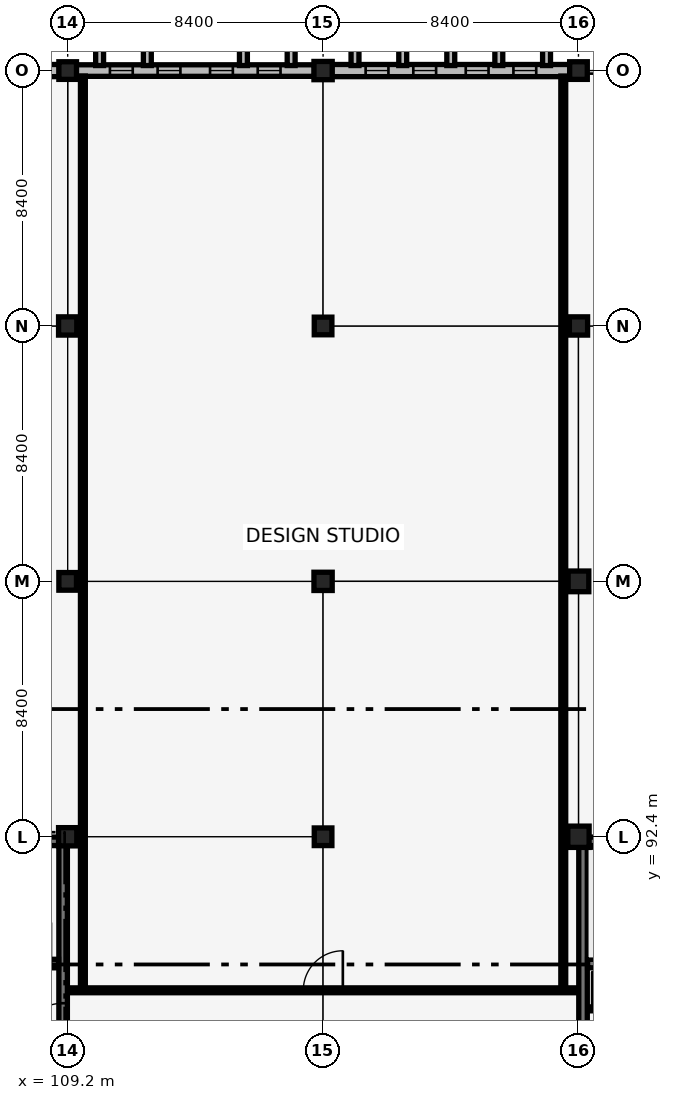
"""IFC4 building model, lengths in metres.
Left out: names, types, materials, properties, quantities, classifications, styles, units other than length and angle.
Written with IfcOpenShell. Run it as: python <this file> out.ifc"""

import sys

from ifc_helpers import new_model, si_unit, direction, frame, frame_2d, origin, origin_2d, place, context, subcontext, project, spatial, rectangle, extrude, element, fill, save


model = new_model("IFC4")
c1 = context("Model", 3, precision=1e-05, world=origin(), true_north=direction((0.0, 1.0)))
c2 = subcontext(c1, "Body", "Model", "MODEL_VIEW")
j1 = project(units=[si_unit("LENGTHUNIT", "METRE"), si_unit("PLANEANGLEUNIT", "RADIAN")], contexts=[c1])
p1 = place(None, origin())
s1 = spatial("IfcSite", under=j1, at=p1, CompositionType="ELEMENT")
p2 = place(p1, origin())
s2 = spatial("IfcBuilding", under=s1, at=p2, CompositionType="ELEMENT")
p3 = place(p2, frame((0.0, 0.0, 9.86)))
s3 = spatial("IfcBuildingStorey", under=s2, at=p3, CompositionType="ELEMENT", Elevation=9.86)
for number, where, z_axis, x_axis in (
    (1, (126.15, 92.25, 0.0), (0.0, 0.0, 1.0), (1.0, 0.0, 0.0)),
    (2, (126.15, 84.15, 0.0), (0.0, 0.0, 1.0), (0.0, 1.0, 0.0)),
):
    element("IfcWall", number, at=place(p3, frame(where, z_axis=z_axis, x_axis=x_axis)), inside=s3, PredefinedType="SHEAR", context=c2, shape_type="SweptSolid", body=[
        extrude(rectangle(XDim=8.1, YDim=0.28, at=frame_2d((4.05, 0.0))), origin(), (0.0, 0.0, 1.0), 3.78),
    ])
p4 = place(p3, frame((126.3, 88.23, 0.0), z_axis=(0.0, 0.0, 1.0), x_axis=(1.0, 0.0, 0.0)))
e3 = element("IfcWall", 3, at=p4, inside=s3, PredefinedType="SHEAR", context=c2, shape_type="SweptSolid", body=[
    extrude(rectangle(XDim=7.8, YDim=0.28, at=frame_2d((3.9, 0.0))), origin(), (0.0, 0.0, 1.0), 3.78),
])
p5 = place(p4, frame((6.2, 0.0, 0.0)))
e4 = element("IfcOpeningElement", 4, at=p5, cuts=e3, PredefinedType="OPENING", context=c2, shape_type="SweptSolid", body=[
    extrude(rectangle(XDim=1.35, YDim=2.15, at=frame_2d((0.675, 1.075))), frame((0.0, 0.15, 0.0), z_axis=(0.0, -1.0, 0.0), x_axis=(1.0, 0.0, 0.0)), (0.0, 0.0, 1.0), 0.3),
])
p6 = place(p3, frame((100.95, 92.25, 0.0), z_axis=(0.0, 0.0, 1.0), x_axis=(1.0, 0.0, 0.0)))
e5 = element("IfcWall", 5, at=p6, inside=s3, PredefinedType="SHEAR", context=c2, shape_type="SweptSolid", body=[
    extrude(rectangle(XDim=8.1, YDim=0.28, at=frame_2d((4.05, 0.0))), origin(), (0.0, 0.0, 1.0), 3.78),
])
p7 = place(p3, frame((109.05, 84.15, 0.0), z_axis=(0.0, 0.0, 1.0), x_axis=(0.0, 1.0, 0.0)))
e6 = element("IfcWall", 6, at=p7, inside=s3, PredefinedType="SHEAR", context=c2, shape_type="SweptSolid", body=[
    extrude(rectangle(XDim=8.1, YDim=0.28, at=frame_2d((4.05, 0.0))), origin(), (0.0, 0.0, 1.0), 3.78),
])
p8 = place(p7, frame((1.325, 0.0, 0.0)))
e7 = element("IfcOpeningElement", 7, at=p8, cuts=e6, PredefinedType="OPENING", context=c2, shape_type="SweptSolid", body=[
    extrude(rectangle(XDim=1.45, YDim=2.15, at=frame_2d((0.725, 1.075))), frame((0.0, 0.15, 0.0), z_axis=(0.0, -1.0, 0.0), x_axis=(1.0, 0.0, 0.0)), (0.0, 0.0, 1.0), 0.3),
])
p9 = place(p3, frame((101.1, 88.23, 0.0), z_axis=(0.0, 0.0, 1.0), x_axis=(1.0, 0.0, 0.0)))
e8 = element("IfcWall", 8, at=p9, inside=s3, PredefinedType="SHEAR", context=c2, shape_type="SweptSolid", body=[
    extrude(rectangle(XDim=7.8, YDim=0.28, at=frame_2d((3.9, 0.0))), origin(), (0.0, 0.0, 1.0), 3.78),
])
p10 = place(p9, frame((6.2, 0.0, 0.0)))
e9 = element("IfcOpeningElement", 9, at=p10, cuts=e8, PredefinedType="OPENING", context=c2, shape_type="SweptSolid", body=[
    extrude(rectangle(XDim=1.35, YDim=2.15, at=frame_2d((0.675, 1.075))), frame((0.0, 0.15, 0.0), z_axis=(0.0, -1.0, 0.0), x_axis=(1.0, 0.0, 0.0)), (0.0, 0.0, 1.0), 0.3),
])
p11 = place(p3, frame((109.2, 92.4, 0.0), z_axis=(0.0, 0.0, 1.0), x_axis=(1.0, 0.0, 0.0)))
e10 = element("IfcColumn", 10, at=p11, inside=s3, PredefinedType="COLUMN", context=c2, shape_type="SweptSolid", body=[
    extrude(rectangle(XDim=0.6, YDim=0.6, at=origin_2d()), origin(), (0.0, 0.0, 1.0), 3.78),
])
p12 = place(p3, frame((109.2, 100.8, 0.0), z_axis=(0.0, 0.0, 1.0), x_axis=(1.0, 0.0, 0.0)))
e11 = element("IfcColumn", 11, at=p12, inside=s3, PredefinedType="COLUMN", context=c2, shape_type="SweptSolid", body=[
    extrude(rectangle(XDim=0.58, YDim=0.58, at=origin_2d()), origin(), (0.0, 0.0, 1.0), 3.78),
])
p13 = place(p3, frame((109.2, 109.2, 0.0), z_axis=(0.0, 0.0, 1.0), x_axis=(1.0, 0.0, 0.0)))
e12 = element("IfcColumn", 12, at=p13, inside=s3, PredefinedType="COLUMN", context=c2, shape_type="SweptSolid", body=[
    extrude(rectangle(XDim=0.6, YDim=0.6, at=origin_2d()), origin(), (0.0, 0.0, 1.0), 3.78),
])
for number, where, z_axis, x_axis in (
    (13, (109.2, 117.6, 0.0), (0.0, 0.0, 1.0), (1.0, 0.0, 0.0)),
    (14, (117.6, 92.4, 0.0), (0.0, 0.0, 1.0), (1.0, 0.0, 0.0)),
):
    element("IfcColumn", number, at=place(p3, frame(where, z_axis=z_axis, x_axis=x_axis)), inside=s3, PredefinedType="COLUMN", context=c2, shape_type="SweptSolid", body=[
        extrude(rectangle(XDim=0.58, YDim=0.58, at=origin_2d()), origin(), (0.0, 0.0, 1.0), 3.78),
    ])
p14 = place(p3, frame((117.6, 100.8, 0.0), z_axis=(0.0, 0.0, 1.0), x_axis=(1.0, 0.0, 0.0)))
e15 = element("IfcColumn", 15, at=p14, inside=s3, PredefinedType="COLUMN", context=c2, shape_type="SweptSolid", body=[
    extrude(rectangle(XDim=0.6, YDim=0.6, at=origin_2d()), origin(), (0.0, 0.0, 1.0), 3.78),
])
p15 = place(p3, frame((117.6, 109.2, 0.0), z_axis=(0.0, 0.0, 1.0), x_axis=(1.0, 0.0, 0.0)))
e16 = element("IfcColumn", 16, at=p15, inside=s3, PredefinedType="COLUMN", context=c2, shape_type="SweptSolid", body=[
    extrude(rectangle(XDim=0.58, YDim=0.58, at=origin_2d()), origin(), (0.0, 0.0, 1.0), 3.78),
])
p16 = place(p3, frame((117.6, 117.6, 0.0), z_axis=(0.0, 0.0, 1.0), x_axis=(1.0, 0.0, 0.0)))
e17 = element("IfcColumn", 17, at=p16, inside=s3, PredefinedType="COLUMN", context=c2, shape_type="SweptSolid", body=[
    extrude(rectangle(XDim=0.6, YDim=0.6, at=origin_2d()), origin(), (0.0, 0.0, 1.0), 3.78),
])
p17 = place(p3, frame((126.0, 92.4, 0.0), z_axis=(0.0, 0.0, 1.0), x_axis=(1.0, 0.0, 0.0)))
e18 = element("IfcColumn", 18, at=p17, inside=s3, PredefinedType="COLUMN", context=c2, shape_type="SweptSolid", body=[
    extrude(rectangle(XDim=0.7, YDim=0.7, at=origin_2d()), origin(), (0.0, 0.0, 1.0), 3.78),
])
p18 = place(p3, frame((126.0, 100.8, 0.0), z_axis=(0.0, 0.0, 1.0), x_axis=(1.0, 0.0, 0.0)))
e19 = element("IfcColumn", 19, at=p18, inside=s3, PredefinedType="COLUMN", context=c2, shape_type="SweptSolid", body=[
    extrude(rectangle(XDim=0.68, YDim=0.68, at=origin_2d()), origin(), (0.0, 0.0, 1.0), 3.78),
])
p19 = place(p3, frame((126.0, 109.2, 0.0), z_axis=(0.0, 0.0, 1.0), x_axis=(1.0, 0.0, 0.0)))
e20 = element("IfcColumn", 20, at=p19, inside=s3, PredefinedType="COLUMN", context=c2, shape_type="SweptSolid", body=[
    extrude(rectangle(XDim=0.6, YDim=0.6, at=origin_2d()), origin(), (0.0, 0.0, 1.0), 3.78),
])
p20 = place(p3, frame((126.0, 117.6, 0.0), z_axis=(0.0, 0.0, 1.0), x_axis=(1.0, 0.0, 0.0)))
e21 = element("IfcColumn", 21, at=p20, inside=s3, PredefinedType="COLUMN", context=c2, shape_type="SweptSolid", body=[
    extrude(rectangle(XDim=0.58, YDim=0.58, at=origin_2d()), origin(), (0.0, 0.0, 1.0), 3.78),
])
p21 = place(p3, frame((101.085, 117.6, 0.0), z_axis=(0.0, 0.0, 1.0), x_axis=(1.0, 0.0, 0.0)))
e22 = element("IfcWall", 22, at=p21, inside=s3, PredefinedType="SOLIDWALL", context=c2, shape_type="SweptSolid", body=[
    extrude(rectangle(XDim=7.84, YDim=0.4, at=frame_2d((3.92, 0.0))), origin(), (0.0, 0.0, 1.0), 3.01),
])
p22 = place(p21, frame((1.115, 0.0, 0.7)))
e23 = element("IfcOpeningElement", 23, at=p22, cuts=e22, PredefinedType="OPENING", context=c2, shape_type="SweptSolid", body=[
    extrude(rectangle(XDim=0.75, YDim=2.1, at=frame_2d((0.375, 1.05))), frame((0.0, 0.21, 0.0), z_axis=(0.0, -1.0, 0.0), x_axis=(1.0, 0.0, 0.0)), (0.0, 0.0, 1.0), 0.42),
])
p23 = place(p21, frame((2.683, 0.0, 0.7)))
e24 = element("IfcOpeningElement", 24, at=p23, cuts=e22, PredefinedType="OPENING", context=c2, shape_type="SweptSolid", body=[
    extrude(rectangle(XDim=0.75, YDim=2.1, at=frame_2d((0.375, 1.05))), frame((0.0, 0.21, 0.0), z_axis=(0.0, -1.0, 0.0), x_axis=(1.0, 0.0, 0.0)), (0.0, 0.0, 1.0), 0.42),
])
p24 = place(p21, frame((4.407, 0.0, 0.7)))
e25 = element("IfcOpeningElement", 25, at=p24, cuts=e22, PredefinedType="OPENING", context=c2, shape_type="SweptSolid", body=[
    extrude(rectangle(XDim=0.75, YDim=2.1, at=frame_2d((0.375, 1.05))), frame((0.0, 0.21, 0.0), z_axis=(0.0, -1.0, 0.0), x_axis=(1.0, 0.0, 0.0)), (0.0, 0.0, 1.0), 0.42),
])
p25 = place(p21, frame((5.975, 0.0, 0.7)))
e26 = element("IfcOpeningElement", 26, at=p25, cuts=e22, PredefinedType="OPENING", context=c2, shape_type="SweptSolid", body=[
    extrude(rectangle(XDim=0.75, YDim=2.1, at=frame_2d((0.375, 1.05))), frame((0.0, 0.21, 0.0), z_axis=(0.0, -1.0, 0.0), x_axis=(1.0, 0.0, 0.0)), (0.0, 0.0, 1.0), 0.42),
])
p26 = place(p3, frame((109.475, 117.6, 0.0), z_axis=(0.0, 0.0, 1.0), x_axis=(1.0, 0.0, 0.0)))
e27 = element("IfcWall", 27, at=p26, inside=s3, PredefinedType="SOLIDWALL", context=c2, shape_type="SweptSolid", body=[
    extrude(rectangle(XDim=7.84, YDim=0.38, at=frame_2d((3.92, 0.0))), origin(), (0.0, 0.0, 1.0), 3.01),
])
p27 = place(p26, frame((1.115, 0.0, 0.7)))
e28 = element("IfcOpeningElement", 28, at=p27, cuts=e27, PredefinedType="OPENING", context=c2, shape_type="SweptSolid", body=[
    extrude(rectangle(XDim=0.75, YDim=2.1, at=frame_2d((0.375, 1.05))), frame((0.0, 0.2, 0.0), z_axis=(0.0, -1.0, 0.0), x_axis=(1.0, 0.0, 0.0)), (0.0, 0.0, 1.0), 0.4),
])
p28 = place(p26, frame((2.683, 0.0, 0.7)))
e29 = element("IfcOpeningElement", 29, at=p28, cuts=e27, PredefinedType="OPENING", context=c2, shape_type="SweptSolid", body=[
    extrude(rectangle(XDim=0.75, YDim=2.1, at=frame_2d((0.375, 1.05))), frame((0.0, 0.2, 0.0), z_axis=(0.0, -1.0, 0.0), x_axis=(1.0, 0.0, 0.0)), (0.0, 0.0, 1.0), 0.4),
])
p29 = place(p26, frame((4.407, 0.0, 0.7)))
e30 = element("IfcOpeningElement", 30, at=p29, cuts=e27, PredefinedType="OPENING", context=c2, shape_type="SweptSolid", body=[
    extrude(rectangle(XDim=0.75, YDim=2.1, at=frame_2d((0.375, 1.05))), frame((0.0, 0.2, 0.0), z_axis=(0.0, -1.0, 0.0), x_axis=(1.0, 0.0, 0.0)), (0.0, 0.0, 1.0), 0.4),
])
p30 = place(p26, frame((5.975, 0.0, 0.7)))
e31 = element("IfcOpeningElement", 31, at=p30, cuts=e27, PredefinedType="OPENING", context=c2, shape_type="SweptSolid", body=[
    extrude(rectangle(XDim=0.75, YDim=2.1, at=frame_2d((0.375, 1.05))), frame((0.0, 0.2, 0.0), z_axis=(0.0, -1.0, 0.0), x_axis=(1.0, 0.0, 0.0)), (0.0, 0.0, 1.0), 0.4),
])
for number, where, z_axis, x_axis in (
    (32, (110.25, 117.765, 0.0), (0.0, 0.0, 1.0), (0.0, 1.0, 0.0)),
    (33, (111.82, 117.765, 0.0), (0.0, 0.0, 1.0), (0.0, 1.0, 0.0)),
    (34, (114.98, 117.765, 0.0), (0.0, 0.0, 1.0), (0.0, 1.0, 0.0)),
    (35, (116.55, 117.765, 0.0), (0.0, 0.0, 1.0), (0.0, 1.0, 0.0)),
):
    element("IfcWall", number, at=place(p3, frame(where, z_axis=z_axis, x_axis=x_axis)), inside=s3, PredefinedType="SOLIDWALL", context=c2, shape_type="SweptSolid", body=[
        extrude(rectangle(XDim=0.7, YDim=0.26, at=frame_2d((0.35, 0.0))), origin(), (0.0, 0.0, 1.0), 4.08),
    ])
p31 = place(p3, frame((117.885, 117.6, 0.0), z_axis=(0.0, 0.0, 1.0), x_axis=(1.0, 0.0, 0.0)))
e36 = element("IfcWall", 36, at=p31, inside=s3, PredefinedType="SOLIDWALL", context=c2, shape_type="SweptSolid", body=[
    extrude(rectangle(XDim=7.84, YDim=0.4, at=frame_2d((3.92, 0.0))), origin(), (0.0, 0.0, 1.0), 3.01),
])
p32 = place(p31, frame((1.115, 0.0, 0.7)))
e37 = element("IfcOpeningElement", 37, at=p32, cuts=e36, PredefinedType="OPENING", context=c2, shape_type="SweptSolid", body=[
    extrude(rectangle(XDim=0.75, YDim=2.1, at=frame_2d((0.375, 1.05))), frame((0.0, 0.21, 0.0), z_axis=(0.0, -1.0, 0.0), x_axis=(1.0, 0.0, 0.0)), (0.0, 0.0, 1.0), 0.42),
])
p33 = place(p31, frame((2.683, 0.0, 0.7)))
e38 = element("IfcOpeningElement", 38, at=p33, cuts=e36, PredefinedType="OPENING", context=c2, shape_type="SweptSolid", body=[
    extrude(rectangle(XDim=0.75, YDim=2.1, at=frame_2d((0.375, 1.05))), frame((0.0, 0.21, 0.0), z_axis=(0.0, -1.0, 0.0), x_axis=(1.0, 0.0, 0.0)), (0.0, 0.0, 1.0), 0.42),
])
p34 = place(p31, frame((4.407, 0.0, 0.7)))
e39 = element("IfcOpeningElement", 39, at=p34, cuts=e36, PredefinedType="OPENING", context=c2, shape_type="SweptSolid", body=[
    extrude(rectangle(XDim=0.75, YDim=2.1, at=frame_2d((0.375, 1.05))), frame((0.0, 0.21, 0.0), z_axis=(0.0, -1.0, 0.0), x_axis=(1.0, 0.0, 0.0)), (0.0, 0.0, 1.0), 0.42),
])
p35 = place(p31, frame((5.975, 0.0, 0.7)))
e40 = element("IfcOpeningElement", 40, at=p35, cuts=e36, PredefinedType="OPENING", context=c2, shape_type="SweptSolid", body=[
    extrude(rectangle(XDim=0.75, YDim=2.1, at=frame_2d((0.375, 1.05))), frame((0.0, 0.21, 0.0), z_axis=(0.0, -1.0, 0.0), x_axis=(1.0, 0.0, 0.0)), (0.0, 0.0, 1.0), 0.42),
])
for number, where, z_axis, x_axis in (
    (41, (118.65, 117.765, 0.0), (0.0, 0.0, 1.0), (0.0, 1.0, 0.0)),
    (42, (120.22, 117.765, 0.0), (0.0, 0.0, 1.0), (0.0, 1.0, 0.0)),
    (43, (121.8, 117.765, 0.0), (0.0, 0.0, 1.0), (0.0, 1.0, 0.0)),
    (44, (123.38, 117.765, 0.0), (0.0, 0.0, 1.0), (0.0, 1.0, 0.0)),
    (45, (124.95, 117.765, 0.0), (0.0, 0.0, 1.0), (0.0, 1.0, 0.0)),
):
    element("IfcWall", number, at=place(p3, frame(where, z_axis=z_axis, x_axis=x_axis)), inside=s3, PredefinedType="SOLIDWALL", context=c2, shape_type="SweptSolid", body=[
        extrude(rectangle(XDim=0.7, YDim=0.26, at=frame_2d((0.35, 0.0))), origin(), (0.0, 0.0, 1.0), 4.08),
    ])
p36 = place(p3, frame((126.32, 86.74, 0.0), z_axis=(0.0, 0.0, 1.0), x_axis=(1.0, 0.0, 0.0)))
e46 = element("IfcWall", 46, at=p36, inside=s3, PredefinedType="PARTITIONING", context=c2, shape_type="SweptSolid", body=[
    extrude(rectangle(XDim=1.62, YDim=0.13, at=frame_2d((0.81, 0.0))), origin(), (0.0, 0.0, 1.0), 3.78),
])
p37 = place(p3, frame((109.23, 87.35, 0.0), z_axis=(0.0, 0.0, 1.0), x_axis=(1.0, 0.0, 0.0)))
e47 = element("IfcWall", 47, at=p37, inside=s3, PredefinedType="PARTITIONING", context=c2, shape_type="SweptSolid", body=[
    extrude(rectangle(XDim=16.74, YDim=0.16, at=frame_2d((8.37, 0.0))), origin(), (0.0, 0.0, 1.0), 2.95),
])
p38 = place(p37, frame((7.72, 0.0, 0.0)))
e48 = element("IfcOpeningElement", 48, at=p38, cuts=e47, PredefinedType="OPENING", context=c2, shape_type="SweptSolid", body=[
    extrude(rectangle(XDim=1.3, YDim=2.2, at=frame_2d((0.65, 1.1))), frame((0.0, 0.09, 0.0), z_axis=(0.0, -1.0, 0.0), x_axis=(1.0, 0.0, 0.0)), (0.0, 0.0, 1.0), 0.18),
])
for number, where, z_axis, x_axis in (
    (49, (109.7, 87.5, 0.0), (0.0, 0.0, 1.0), (0.0, 1.0, 0.0)),
    (50, (125.5, 87.5, 0.0), (0.0, 0.0, 1.0), (0.0, 1.0, 0.0)),
):
    element("IfcWall", number, at=place(p3, frame(where, z_axis=z_axis, x_axis=x_axis)), inside=s3, PredefinedType="PARTITIONING", context=c2, shape_type="SweptSolid", body=[
        extrude(rectangle(XDim=29.92, YDim=0.16, at=frame_2d((14.96, 0.0))), origin(), (0.0, 0.0, 1.0), 2.91),
    ])
p39 = place(p27, origin())
e51 = element("IfcWindow", 51, at=p39, inside=s3, PartitioningType="DOUBLE_PANEL_VERTICAL", PredefinedType="WINDOW", context=c2, shape_type="SweptSolid", body=[
    extrude(rectangle(XDim=0.75, YDim=2.1, at=frame_2d((0.375, 1.05))), frame((0.0, 0.03, 0.0), z_axis=(0.0, -1.0, 0.0), x_axis=(1.0, 0.0, 0.0)), (0.0, 0.0, 1.0), 0.06),
])
fill(e28, e51)
p40 = place(p28, origin())
e52 = element("IfcWindow", 52, at=p40, inside=s3, PartitioningType="DOUBLE_PANEL_VERTICAL", PredefinedType="WINDOW", context=c2, shape_type="SweptSolid", body=[
    extrude(rectangle(XDim=0.75, YDim=2.1, at=frame_2d((0.375, 1.05))), frame((0.0, 0.03, 0.0), z_axis=(0.0, -1.0, 0.0), x_axis=(1.0, 0.0, 0.0)), (0.0, 0.0, 1.0), 0.06),
])
fill(e29, e52)
p41 = place(p29, origin())
e53 = element("IfcWindow", 53, at=p41, inside=s3, PartitioningType="DOUBLE_PANEL_VERTICAL", PredefinedType="WINDOW", context=c2, shape_type="SweptSolid", body=[
    extrude(rectangle(XDim=0.75, YDim=2.1, at=frame_2d((0.375, 1.05))), frame((0.0, 0.03, 0.0), z_axis=(0.0, -1.0, 0.0), x_axis=(1.0, 0.0, 0.0)), (0.0, 0.0, 1.0), 0.06),
])
fill(e30, e53)
p42 = place(p30, origin())
e54 = element("IfcWindow", 54, at=p42, inside=s3, PartitioningType="DOUBLE_PANEL_VERTICAL", PredefinedType="WINDOW", context=c2, shape_type="SweptSolid", body=[
    extrude(rectangle(XDim=0.75, YDim=2.1, at=frame_2d((0.375, 1.05))), frame((0.0, 0.03, 0.0), z_axis=(0.0, -1.0, 0.0), x_axis=(1.0, 0.0, 0.0)), (0.0, 0.0, 1.0), 0.06),
])
fill(e31, e54)
p43 = place(p32, origin())
e55 = element("IfcWindow", 55, at=p43, inside=s3, PartitioningType="DOUBLE_PANEL_VERTICAL", PredefinedType="WINDOW", context=c2, shape_type="SweptSolid", body=[
    extrude(rectangle(XDim=0.75, YDim=2.1, at=frame_2d((0.375, 1.05))), frame((0.0, 0.03, 0.0), z_axis=(0.0, -1.0, 0.0), x_axis=(1.0, 0.0, 0.0)), (0.0, 0.0, 1.0), 0.06),
])
fill(e37, e55)
p44 = place(p33, origin())
e56 = element("IfcWindow", 56, at=p44, inside=s3, PartitioningType="DOUBLE_PANEL_VERTICAL", PredefinedType="WINDOW", context=c2, shape_type="SweptSolid", body=[
    extrude(rectangle(XDim=0.75, YDim=2.1, at=frame_2d((0.375, 1.05))), frame((0.0, 0.03, 0.0), z_axis=(0.0, -1.0, 0.0), x_axis=(1.0, 0.0, 0.0)), (0.0, 0.0, 1.0), 0.06),
])
fill(e38, e56)
p45 = place(p34, origin())
e57 = element("IfcWindow", 57, at=p45, inside=s3, PartitioningType="DOUBLE_PANEL_VERTICAL", PredefinedType="WINDOW", context=c2, shape_type="SweptSolid", body=[
    extrude(rectangle(XDim=0.75, YDim=2.1, at=frame_2d((0.375, 1.05))), frame((0.0, 0.03, 0.0), z_axis=(0.0, -1.0, 0.0), x_axis=(1.0, 0.0, 0.0)), (0.0, 0.0, 1.0), 0.06),
])
fill(e39, e57)
p46 = place(p35, origin())
e58 = element("IfcWindow", 58, at=p46, inside=s3, PartitioningType="DOUBLE_PANEL_VERTICAL", PredefinedType="WINDOW", context=c2, shape_type="SweptSolid", body=[
    extrude(rectangle(XDim=0.75, YDim=2.1, at=frame_2d((0.375, 1.05))), frame((0.0, 0.03, 0.0), z_axis=(0.0, -1.0, 0.0), x_axis=(1.0, 0.0, 0.0)), (0.0, 0.0, 1.0), 0.06),
])
fill(e40, e58)
p47 = place(p8, origin())
e59 = element("IfcDoor", 59, at=p47, inside=s3, OperationType="DOUBLE_DOOR_SINGLE_SWING", PredefinedType="DOOR", context=c2, shape_type="SweptSolid", body=[
    extrude(rectangle(XDim=1.45, YDim=2.15, at=frame_2d((0.725, 1.075))), frame((0.0, 0.025, 0.0), z_axis=(0.0, -1.0, 0.0), x_axis=(1.0, 0.0, 0.0)), (0.0, 0.0, 1.0), 0.05),
])
fill(e7, e59)
p48 = place(p38, origin())
e60 = element("IfcDoor", 60, at=p48, inside=s3, OperationType="SINGLE_SWING_RIGHT", PredefinedType="DOOR", context=c2, shape_type="SweptSolid", body=[
    extrude(rectangle(XDim=1.3, YDim=2.2, at=frame_2d((0.65, 1.1))), frame((0.0, 0.025, 0.0), z_axis=(0.0, -1.0, 0.0), x_axis=(1.0, 0.0, 0.0)), (0.0, 0.0, 1.0), 0.05),
])
fill(e48, e60)
save(model, sys.argv[1])
